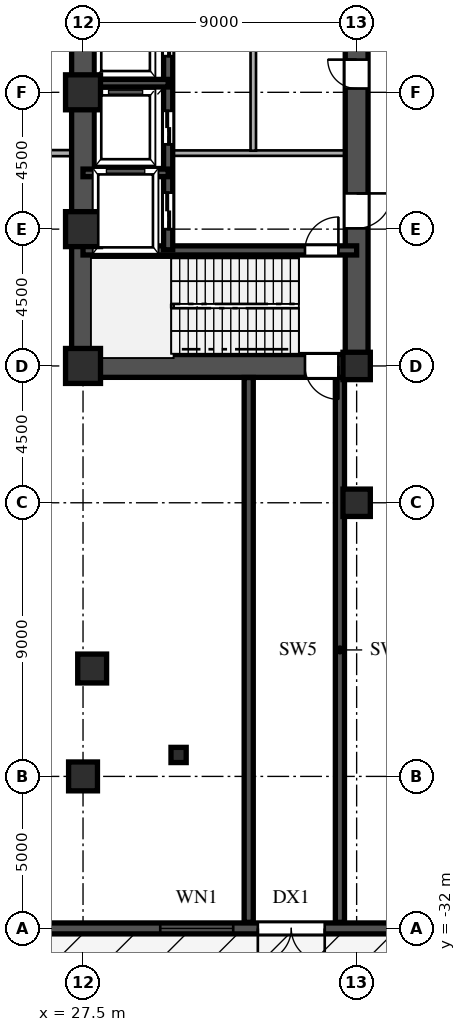
"""IFC4 building model, lengths in metres.
Left out: names, types, materials, properties, quantities, classifications, styles, units other than length and angle.
Written with IfcOpenShell. Run it as: python <this file> out.ifc"""

import sys

from ifc_helpers import new_model, si_unit, direction, frame, frame_2d, origin, origin_2d, place, context, subcontext, project, spatial, rectangle, hollow_rectangle, i_section, extrude, source, transform, mapped, element, fill, save


model = new_model("IFC4")
c1 = context("Model", 3, precision=1e-05, world=origin(), true_north=direction((0.0, 1.0)))
c2 = subcontext(c1, "Body", "Model", "MODEL_VIEW")
j1 = project(units=[si_unit("LENGTHUNIT", "METRE"), si_unit("PLANEANGLEUNIT", "RADIAN")], contexts=[c1])
p1 = place(None, origin())
s1 = spatial("IfcSite", under=j1, at=p1, CompositionType="ELEMENT")
p2 = place(p1, origin())
s2 = spatial("IfcBuilding", under=s1, at=p2, CompositionType="ELEMENT")
p3 = place(p2, origin())
s3 = spatial("IfcBuildingStorey", under=s2, at=p3, CompositionType="ELEMENT", Elevation=0.0)
m1 = source(origin(), c2, "Body", "SweptSolid", [
    extrude(hollow_rectangle(XDim=1.15, YDim=1.15, WallThickness=0.048, at=origin_2d()), origin(), (0.0, 0.0, 1.0), 5.4),
])
for number, where, z_axis, x_axis in (
    (1, (27.5, -13.5, 0.0), (0.0, 0.0, 1.0), (1.0, 0.0, 0.0)),
    (2, (27.5, -9.0, 0.0), (0.0, 0.0, 1.0), (1.0, 0.0, 0.0)),
    (3, (27.5, -4.5, 0.0), (0.0, 0.0, 1.0), (1.0, 0.0, 0.0)),
):
    element("IfcColumn", number, at=place(p3, frame(where, z_axis=z_axis, x_axis=x_axis)), inside=s3, PredefinedType="COLUMN", context=c2, shape_type="MappedRepresentation", body=[
        mapped(m1, transform((0.0, 0.0, 0.0), scale=1.0)),
    ])
m2 = source(origin(), c2, "Body", "SweptSolid", [
    extrude(rectangle(XDim=0.95, YDim=0.95, at=origin_2d()), origin(), (0.0, 0.0, 1.0), 5.4),
])
p4 = place(p3, frame((27.5, -27.0, 0.0), z_axis=(0.0, 0.0, 1.0), x_axis=(1.0, 0.0, 0.0)))
e4 = element("IfcColumn", 4, at=p4, inside=s3, PredefinedType="COLUMN", context=c2, shape_type="MappedRepresentation", body=[
    mapped(m2, transform((0.0, 0.0, 0.0), scale=1.0)),
])
m3 = source(origin(), c2, "Body", "SweptSolid", [
    extrude(i_section(OverallWidth=0.9, OverallDepth=0.9, WebThickness=0.036, FlangeThickness=0.055, at=origin_2d()), origin(), (0.0, 0.0, 1.0), 5.4),
])
for number, where, z_axis, x_axis in (
    (5, (36.5, -18.0, 0.0), (0.0, 0.0, 1.0), (1.0, 0.0, 0.0)),
    (6, (36.5, -13.5, 0.0), (0.0, 0.0, 1.0), (1.0, 0.0, 0.0)),
):
    element("IfcColumn", number, at=place(p3, frame(where, z_axis=z_axis, x_axis=x_axis)), inside=s3, PredefinedType="COLUMN", context=c2, shape_type="MappedRepresentation", body=[
        mapped(m3, transform((0.0, 0.0, 0.0), scale=1.0)),
    ])
m4 = source(origin(), c2, "Body", "SweptSolid", [
    extrude(hollow_rectangle(XDim=0.5, YDim=0.5, WallThickness=0.02, at=origin_2d()), origin(), (0.0, 0.0, 1.0), 5.4),
])
p5 = place(p3, frame((30.643, -26.295, 0.0), z_axis=(0.0, 0.0, 1.0), x_axis=(1.0, 0.0, 0.0)))
e7 = element("IfcColumn", 7, at=p5, inside=s3, PredefinedType="COLUMN", context=c2, shape_type="MappedRepresentation", body=[
    mapped(m4, transform((0.0, 0.0, 0.0), scale=1.0)),
])
p6 = place(p3, frame((27.8, -23.451, 0.0), z_axis=(0.0, 0.0, 1.0), x_axis=(1.0, 0.0, 0.0)))
e8 = element("IfcColumn", 8, at=p6, inside=s3, PredefinedType="COLUMN", context=c2, shape_type="MappedRepresentation", body=[
    mapped(m2, transform((0.0, 0.0, 0.0), scale=1.0)),
])
p7 = place(p3, frame((-71.96, -32.0, 0.0), z_axis=(0.0, 0.0, 1.0), x_axis=(1.0, 0.0, 0.0)))
e9 = element("IfcWall", 9, at=p7, inside=s3, PredefinedType="SOLIDWALL", context=c2, shape_type="SweptSolid", body=[
    extrude(rectangle(XDim=143.92, YDim=0.36, at=frame_2d((71.96, 0.0))), origin(), (0.0, 0.0, 1.0), 5.12),
])
p8 = place(p7, frame((18.0, 0.0, 0.0)))
e10 = element("IfcOpeningElement", 10, at=p8, cuts=e9, PredefinedType="OPENING", context=c2, shape_type="SweptSolid", body=[
    extrude(rectangle(XDim=2.2, YDim=2.4, at=frame_2d((1.1, 1.2))), frame((0.0, 0.19, 0.0), z_axis=(0.0, -1.0, 0.0), x_axis=(1.0, 0.0, 0.0)), (0.0, 0.0, 1.0), 0.38),
])
p9 = place(p7, frame((48.0, 0.0, 0.0)))
e11 = element("IfcOpeningElement", 11, at=p9, cuts=e9, PredefinedType="OPENING", context=c2, shape_type="SweptSolid", body=[
    extrude(rectangle(XDim=1.8, YDim=2.4, at=frame_2d((0.9, 1.2))), frame((0.0, 0.19, 0.0), z_axis=(0.0, -1.0, 0.0), x_axis=(1.0, 0.0, 0.0)), (0.0, 0.0, 1.0), 0.38),
])
p10 = place(p7, frame((57.8, 0.0, 0.0)))
e12 = element("IfcOpeningElement", 12, at=p10, cuts=e9, PredefinedType="OPENING", context=c2, shape_type="SweptSolid", body=[
    extrude(rectangle(XDim=6.2, YDim=3.1, at=frame_2d((3.1, 1.55))), frame((0.0, 0.19, 0.0), z_axis=(0.0, -1.0, 0.0), x_axis=(1.0, 0.0, 0.0)), (0.0, 0.0, 1.0), 0.38),
])
p11 = place(p7, frame((70.7, 0.0, 0.0)))
e13 = element("IfcOpeningElement", 13, at=p11, cuts=e9, PredefinedType="OPENING", context=c2, shape_type="SweptSolid", body=[
    extrude(rectangle(XDim=2.2, YDim=2.4, at=frame_2d((1.1, 1.2))), frame((0.0, 0.19, 0.0), z_axis=(0.0, -1.0, 0.0), x_axis=(1.0, 0.0, 0.0)), (0.0, 0.0, 1.0), 0.38),
])
p12 = place(p7, frame((82.2, 0.0, 0.0)))
e14 = element("IfcOpeningElement", 14, at=p12, cuts=e9, PredefinedType="OPENING", context=c2, shape_type="SweptSolid", body=[
    extrude(rectangle(XDim=1.8, YDim=2.4, at=frame_2d((0.9, 1.2))), frame((0.0, 0.19, 0.0), z_axis=(0.0, -1.0, 0.0), x_axis=(1.0, 0.0, 0.0)), (0.0, 0.0, 1.0), 0.38),
])
p13 = place(p7, frame((120.2, 0.0, 0.0)))
e15 = element("IfcOpeningElement", 15, at=p13, cuts=e9, PredefinedType="OPENING", context=c2, shape_type="SweptSolid", body=[
    extrude(rectangle(XDim=2.2, YDim=2.4, at=frame_2d((1.1, 1.2))), frame((0.0, 0.19, 0.0), z_axis=(0.0, -1.0, 0.0), x_axis=(1.0, 0.0, 0.0)), (0.0, 0.0, 1.0), 0.38),
])
p14 = place(p7, frame((36.51, 0.0, 0.0)))
e16 = element("IfcOpeningElement", 16, at=p14, cuts=e9, PredefinedType="OPENING", context=c2, shape_type="SweptSolid", body=[
    extrude(rectangle(XDim=2.2, YDim=2.4, at=frame_2d((1.1, 1.2))), frame((0.0, 0.19, 0.0), z_axis=(0.0, -1.0, 0.0), x_axis=(1.0, 0.0, 0.0)), (0.0, 0.0, 1.0), 0.38),
])
p15 = place(p7, frame((105.21, 0.0, 0.0)))
e17 = element("IfcOpeningElement", 17, at=p15, cuts=e9, PredefinedType="OPENING", context=c2, shape_type="SweptSolid", body=[
    extrude(rectangle(XDim=2.2, YDim=2.4, at=frame_2d((1.1, 1.2))), frame((0.0, 0.19, 0.0), z_axis=(0.0, -1.0, 0.0), x_axis=(1.0, 0.0, 0.0)), (0.0, 0.0, 1.0), 0.38),
])
p16 = place(p7, frame((6.0, 0.0, 0.9)))
e18 = element("IfcOpeningElement", 18, at=p16, cuts=e9, PredefinedType="OPENING", context=c2, shape_type="SweptSolid", body=[
    extrude(rectangle(XDim=2.4, YDim=2.2, at=frame_2d((1.2, 1.1))), frame((0.0, 0.19, 0.0), z_axis=(0.0, -1.0, 0.0), x_axis=(1.0, 0.0, 0.0)), (0.0, 0.0, 1.0), 0.38),
])
p17 = place(p7, frame((12.0, 0.0, 0.9)))
e19 = element("IfcOpeningElement", 19, at=p17, cuts=e9, PredefinedType="OPENING", context=c2, shape_type="SweptSolid", body=[
    extrude(rectangle(XDim=2.4, YDim=2.2, at=frame_2d((1.2, 1.1))), frame((0.0, 0.19, 0.0), z_axis=(0.0, -1.0, 0.0), x_axis=(1.0, 0.0, 0.0)), (0.0, 0.0, 1.0), 0.38),
])
p18 = place(p7, frame((28.0, 0.0, 0.9)))
e20 = element("IfcOpeningElement", 20, at=p18, cuts=e9, PredefinedType="OPENING", context=c2, shape_type="SweptSolid", body=[
    extrude(rectangle(XDim=2.4, YDim=2.2, at=frame_2d((1.2, 1.1))), frame((0.0, 0.19, 0.0), z_axis=(0.0, -1.0, 0.0), x_axis=(1.0, 0.0, 0.0)), (0.0, 0.0, 1.0), 0.38),
])
p19 = place(p7, frame((91.0, 0.0, 0.9)))
e21 = element("IfcOpeningElement", 21, at=p19, cuts=e9, PredefinedType="OPENING", context=c2, shape_type="SweptSolid", body=[
    extrude(rectangle(XDim=2.4, YDim=2.2, at=frame_2d((1.2, 1.1))), frame((0.0, 0.19, 0.0), z_axis=(0.0, -1.0, 0.0), x_axis=(1.0, 0.0, 0.0)), (0.0, 0.0, 1.0), 0.38),
])
p20 = place(p7, frame((102.0, 0.0, 0.9)))
e22 = element("IfcOpeningElement", 22, at=p20, cuts=e9, PredefinedType="OPENING", context=c2, shape_type="SweptSolid", body=[
    extrude(rectangle(XDim=2.4, YDim=2.2, at=frame_2d((1.2, 1.1))), frame((0.0, 0.19, 0.0), z_axis=(0.0, -1.0, 0.0), x_axis=(1.0, 0.0, 0.0)), (0.0, 0.0, 1.0), 0.38),
])
p21 = place(p7, frame((110.0, 0.0, 0.9)))
e23 = element("IfcOpeningElement", 23, at=p21, cuts=e9, PredefinedType="OPENING", context=c2, shape_type="SweptSolid", body=[
    extrude(rectangle(XDim=2.4, YDim=2.2, at=frame_2d((1.2, 1.1))), frame((0.0, 0.19, 0.0), z_axis=(0.0, -1.0, 0.0), x_axis=(1.0, 0.0, 0.0)), (0.0, 0.0, 1.0), 0.38),
])
p22 = place(p7, frame((130.0, 0.0, 0.9)))
e24 = element("IfcOpeningElement", 24, at=p22, cuts=e9, PredefinedType="OPENING", context=c2, shape_type="SweptSolid", body=[
    extrude(rectangle(XDim=2.4, YDim=2.2, at=frame_2d((1.2, 1.1))), frame((0.0, 0.19, 0.0), z_axis=(0.0, -1.0, 0.0), x_axis=(1.0, 0.0, 0.0)), (0.0, 0.0, 1.0), 0.38),
])
p23 = place(p3, frame((27.5, -13.5, 0.0), z_axis=(0.0, 0.0, 1.0), x_axis=(0.0, 1.0, 0.0)))
e25 = element("IfcWall", 25, at=p23, inside=s3, PredefinedType="SHEAR", context=c2, shape_type="SweptSolid", body=[
    extrude(rectangle(XDim=12.2, YDim=0.75, at=frame_2d((6.1, 0.0))), origin(), (0.0, 0.0, 1.0), 5.12),
])
p24 = place(p3, frame((27.5, -13.5, 0.0), z_axis=(0.0, 0.0, 1.0), x_axis=(1.0, 0.0, 0.0)))
e26 = element("IfcWall", 26, at=p24, inside=s3, PredefinedType="SHEAR", context=c2, shape_type="SweptSolid", body=[
    extrude(rectangle(XDim=9.0, YDim=0.75, at=frame_2d((4.5, 0.0))), origin(), (0.0, 0.0, 1.0), 5.12),
])
p25 = place(p24, frame((7.3, 0.0, 0.0)))
e27 = element("IfcOpeningElement", 27, at=p25, cuts=e26, PredefinedType="OPENING", context=c2, shape_type="SweptSolid", body=[
    extrude(rectangle(XDim=1.1, YDim=2.2, at=frame_2d((0.55, 1.1))), frame((0.0, 0.385, 0.0), z_axis=(0.0, -1.0, 0.0), x_axis=(1.0, 0.0, 0.0)), (0.0, 0.0, 1.0), 0.77),
])
p26 = place(p3, frame((36.5, -13.65, 0.0), z_axis=(0.0, 0.0, 1.0), x_axis=(0.0, 1.0, 0.0)))
e28 = element("IfcWall", 28, at=p26, inside=s3, PredefinedType="SHEAR", context=c2, shape_type="SweptSolid", body=[
    extrude(rectangle(XDim=7.15, YDim=0.75, at=frame_2d((3.575, 0.0))), origin(), (0.0, 0.0, 1.0), 5.12),
])
p27 = place(p26, frame((4.675, 0.0, 0.0)))
e29 = element("IfcOpeningElement", 29, at=p27, cuts=e28, PredefinedType="OPENING", context=c2, shape_type="SweptSolid", body=[
    extrude(rectangle(XDim=1.15, YDim=2.2, at=frame_2d((0.575, 1.1))), frame((0.0, 0.385, 0.0), z_axis=(0.0, -1.0, 0.0), x_axis=(1.0, 0.0, 0.0)), (0.0, 0.0, 1.0), 0.77),
])
p28 = place(p3, frame((36.5, -6.5, 0.0), z_axis=(0.0, 0.0, 1.0), x_axis=(0.0, 1.0, 0.0)))
e30 = element("IfcWall", 30, at=p28, inside=s3, PredefinedType="SHEAR", context=c2, shape_type="SweptSolid", body=[
    extrude(rectangle(XDim=5.2, YDim=0.75, at=frame_2d((2.6, 0.0))), origin(), (0.0, 0.0, 1.0), 5.12),
])
p29 = place(p28, frame((2.125, 0.0, 0.0)))
e31 = element("IfcOpeningElement", 31, at=p29, cuts=e30, PredefinedType="OPENING", context=c2, shape_type="SweptSolid", body=[
    extrude(rectangle(XDim=0.95, YDim=2.15, at=frame_2d((0.475, 1.075))), frame((0.0, 0.385, 0.0), z_axis=(0.0, -1.0, 0.0), x_axis=(1.0, 0.0, 0.0)), (0.0, 0.0, 1.0), 0.77),
])
p30 = place(p3, frame((27.5, -9.7, 0.0), z_axis=(0.0, 0.0, 1.0), x_axis=(1.0, 0.0, 0.0)))
e32 = element("IfcWall", 32, at=p30, inside=s3, PredefinedType="SHEAR", context=c2, shape_type="SweptSolid", body=[
    extrude(rectangle(XDim=9.0, YDim=0.3, at=frame_2d((4.5, 0.0))), origin(), (0.0, 0.0, 1.0), 5.12),
])
p31 = place(p30, frame((7.3, 0.0, 0.0)))
e33 = element("IfcOpeningElement", 33, at=p31, cuts=e32, PredefinedType="OPENING", context=c2, shape_type="SweptSolid", body=[
    extrude(rectangle(XDim=1.1, YDim=2.2, at=frame_2d((0.55, 1.1))), frame((0.0, 0.16, 0.0), z_axis=(0.0, -1.0, 0.0), x_axis=(1.0, 0.0, 0.0)), (0.0, 0.0, 1.0), 0.32),
])
for number, where, z_axis, x_axis in (
    (34, (27.5, -7.15, 0.0), (0.0, 0.0, 1.0), (1.0, 0.0, 0.0)),
    (35, (27.5, -4.2, 0.0), (0.0, 0.0, 1.0), (1.0, 0.0, 0.0)),
):
    element("IfcWall", number, at=place(p3, frame(where, z_axis=z_axis, x_axis=x_axis)), inside=s3, PredefinedType="SHEAR", context=c2, shape_type="SweptSolid", body=[
        extrude(rectangle(XDim=2.8, YDim=0.25, at=frame_2d((1.4, 0.0))), origin(), (0.0, 0.0, 1.0), 5.12),
    ])
p32 = place(p3, frame((30.3, -9.68, 0.0), z_axis=(0.0, 0.0, 1.0), x_axis=(0.0, 1.0, 0.0)))
e36 = element("IfcWall", 36, at=p32, inside=s3, PredefinedType="SHEAR", context=c2, shape_type="SweptSolid", body=[
    extrude(rectangle(XDim=2.56, YDim=0.3, at=frame_2d((1.28, 0.0))), origin(), (0.0, 0.0, 1.0), 5.12),
])
p33 = place(p32, frame((0.68, 0.0, 0.0)))
e37 = element("IfcOpeningElement", 37, at=p33, cuts=e36, PredefinedType="OPENING", context=c2, shape_type="SweptSolid", body=[
    extrude(rectangle(XDim=1.2, YDim=2.25, at=frame_2d((0.6, 1.125))), frame((0.0, 0.16, 0.0), z_axis=(0.0, -1.0, 0.0), x_axis=(1.0, 0.0, 0.0)), (0.0, 0.0, 1.0), 0.32),
])
p34 = place(p3, frame((30.3, -7.12, 0.0), z_axis=(0.0, 0.0, 1.0), x_axis=(0.0, 1.0, 0.0)))
e38 = element("IfcWall", 38, at=p34, inside=s3, PredefinedType="SHEAR", context=c2, shape_type="SweptSolid", body=[
    extrude(rectangle(XDim=2.92, YDim=0.3, at=frame_2d((1.46, 0.0))), origin(), (0.0, 0.0, 1.0), 5.12),
])
p35 = place(p34, frame((0.91, 0.0, 0.0)))
e39 = element("IfcOpeningElement", 39, at=p35, cuts=e38, PredefinedType="OPENING", context=c2, shape_type="SweptSolid", body=[
    extrude(rectangle(XDim=1.1, YDim=2.2, at=frame_2d((0.55, 1.1))), frame((0.0, 0.16, 0.0), z_axis=(0.0, -1.0, 0.0), x_axis=(1.0, 0.0, 0.0)), (0.0, 0.0, 1.0), 0.32),
])
p36 = place(p3, frame((30.3, -4.2, 0.0), z_axis=(0.0, 0.0, 1.0), x_axis=(0.0, 1.0, 0.0)))
e40 = element("IfcWall", 40, at=p36, inside=s3, PredefinedType="SHEAR", context=c2, shape_type="SweptSolid", body=[
    extrude(rectangle(XDim=2.88, YDim=0.3, at=frame_2d((1.44, 0.0))), origin(), (0.0, 0.0, 1.0), 5.12),
])
p37 = place(p36, frame((0.89, 0.0, 0.0)))
e41 = element("IfcOpeningElement", 41, at=p37, cuts=e40, PredefinedType="OPENING", context=c2, shape_type="SweptSolid", body=[
    extrude(rectangle(XDim=1.1, YDim=2.2, at=frame_2d((0.55, 1.1))), frame((0.0, 0.16, 0.0), z_axis=(0.0, -1.0, 0.0), x_axis=(1.0, 0.0, 0.0)), (0.0, 0.0, 1.0), 0.32),
])
p38 = place(p3, frame((30.45, -6.5, 0.0), z_axis=(0.0, 0.0, 1.0), x_axis=(1.0, 0.0, 0.0)))
e42 = element("IfcWall", 42, at=p38, inside=s3, PredefinedType="PARTITIONING", context=c2, shape_type="SweptSolid", body=[
    extrude(rectangle(XDim=5.7, YDim=0.18, at=frame_2d((2.85, 0.0))), origin(), (0.0, 0.0, 1.0), 5.12),
])
p39 = place(p3, frame((33.1, -6.42, 0.0), z_axis=(0.0, 0.0, 1.0), x_axis=(0.0, 1.0, 0.0)))
e43 = element("IfcWall", 43, at=p39, inside=s3, PredefinedType="PARTITIONING", context=c2, shape_type="SweptSolid", body=[
    extrude(rectangle(XDim=5.04, YDim=0.18, at=frame_2d((2.52, 0.0))), origin(), (0.0, 0.0, 1.0), 5.12),
])
p40 = place(p3, frame((-27.12, -6.5, 0.0), z_axis=(0.0, 0.0, 1.0), x_axis=(1.0, 0.0, 0.0)))
e44 = element("IfcWall", 44, at=p40, inside=s3, PredefinedType="PARTITIONING", context=c2, shape_type="SweptSolid", body=[
    extrude(rectangle(XDim=54.24, YDim=0.2, at=frame_2d((27.12, 0.0))), origin(), (0.0, 0.0, 1.0), 5.12),
])
p41 = place(p40, frame((5.145, 0.0, 0.0)))
e45 = element("IfcOpeningElement", 45, at=p41, cuts=e44, PredefinedType="OPENING", context=c2, shape_type="SweptSolid", body=[
    extrude(rectangle(XDim=0.95, YDim=2.15, at=frame_2d((0.475, 1.075))), frame((0.0, 0.11, 0.0), z_axis=(0.0, -1.0, 0.0), x_axis=(1.0, 0.0, 0.0)), (0.0, 0.0, 1.0), 0.22),
])
p42 = place(p40, frame((37.645, 0.0, 0.0)))
e46 = element("IfcOpeningElement", 46, at=p42, cuts=e44, PredefinedType="OPENING", context=c2, shape_type="SweptSolid", body=[
    extrude(rectangle(XDim=0.95, YDim=2.15, at=frame_2d((0.475, 1.075))), frame((0.0, 0.11, 0.0), z_axis=(0.0, -1.0, 0.0), x_axis=(1.0, 0.0, 0.0)), (0.0, 0.0, 1.0), 0.22),
])
for number, where, z_axis, x_axis in (
    (47, (32.95, -31.8, 0.0), (0.0, 0.0, 1.0), (0.0, 1.0, 0.0)),
    (48, (35.95, -31.8, 0.0), (0.0, 0.0, 1.0), (0.0, 1.0, 0.0)),
):
    element("IfcWall", number, at=place(p3, frame(where, z_axis=z_axis, x_axis=x_axis)), inside=s3, PredefinedType="SHEAR", context=c2, shape_type="SweptSolid", body=[
        extrude(rectangle(XDim=17.92, YDim=0.3, at=frame_2d((8.96, 0.0))), origin(), (0.0, 0.0, 1.0), 5.12),
    ])
m5 = source(origin(), c2, "Body", "SweptSolid", [
    extrude(rectangle(XDim=2.2, YDim=2.4, at=frame_2d((1.1, 1.2))), frame((0.0, 0.025, 0.0), z_axis=(0.0, -1.0, 0.0), x_axis=(1.0, 0.0, 0.0)), (0.0, 0.0, 1.0), 0.05),
])
p43 = place(p15, frame((2.2, 0.0, 0.0), z_axis=(0.0, 0.0, 1.0), x_axis=(-1.0, 0.0, 0.0)))
e49 = element("IfcDoor", 49, at=p43, inside=s3, OperationType="DOUBLE_SWING_LEFT", PredefinedType="DOOR", context=c2, shape_type="MappedRepresentation", body=[
    mapped(m5, transform((0.0, 0.0, 0.0), scale=1.0)),
])
fill(e17, e49)
m6 = source(origin(), c2, "Body", "SweptSolid", [
    extrude(rectangle(XDim=2.4, YDim=2.2, at=frame_2d((1.2, 1.1))), frame((0.0, 0.03, 0.0), z_axis=(0.0, -1.0, 0.0), x_axis=(1.0, 0.0, 0.0)), (0.0, 0.0, 1.0), 0.06),
])
p44 = place(p20, origin())
e50 = element("IfcWindow", 50, at=p44, inside=s3, PartitioningType="SINGLE_PANEL", PredefinedType="WINDOW", context=c2, shape_type="MappedRepresentation", body=[
    mapped(m6, transform((0.0, 0.0, 0.0), scale=1.0)),
])
fill(e22, e50)
m7 = source(origin(), c2, "Body", "SweptSolid", [
    extrude(rectangle(XDim=1.1, YDim=2.2, at=frame_2d((0.55, 1.1))), frame((0.0, 0.025, 0.0), z_axis=(0.0, -1.0, 0.0), x_axis=(1.0, 0.0, 0.0)), (0.0, 0.0, 1.0), 0.05),
])
p45 = place(p25, frame((1.1, 0.0, 0.0), z_axis=(0.0, 0.0, 1.0), x_axis=(-1.0, 0.0, 0.0)))
e51 = element("IfcDoor", 51, at=p45, inside=s3, OperationType="SINGLE_SWING_RIGHT", PredefinedType="DOOR", context=c2, shape_type="MappedRepresentation", body=[
    mapped(m7, transform((0.0, 0.0, 0.0), scale=1.0)),
])
fill(e27, e51)
m8 = source(origin(), c2, "Body", "SweptSolid", [
    extrude(rectangle(XDim=1.15, YDim=2.2, at=frame_2d((0.575, 1.1))), frame((0.0, 0.025, 0.0), z_axis=(0.0, -1.0, 0.0), x_axis=(1.0, 0.0, 0.0)), (0.0, 0.0, 1.0), 0.05),
])
p46 = place(p27, frame((1.15, 0.0, 0.0), z_axis=(0.0, 0.0, 1.0), x_axis=(-1.0, 0.0, 0.0)))
e52 = element("IfcDoor", 52, at=p46, inside=s3, OperationType="SINGLE_SWING_RIGHT", PredefinedType="DOOR", context=c2, shape_type="MappedRepresentation", body=[
    mapped(m8, transform((0.0, 0.0, 0.0), scale=1.0)),
])
fill(e29, e52)
m9 = source(origin(), c2, "Body", "SweptSolid", [
    extrude(rectangle(XDim=0.95, YDim=2.15, at=frame_2d((0.475, 1.075))), frame((0.0, 0.025, 0.0), z_axis=(0.0, -1.0, 0.0), x_axis=(1.0, 0.0, 0.0)), (0.0, 0.0, 1.0), 0.05),
])
p47 = place(p29, origin())
e53 = element("IfcDoor", 53, at=p47, inside=s3, OperationType="SINGLE_SWING_RIGHT", PredefinedType="DOOR", context=c2, shape_type="MappedRepresentation", body=[
    mapped(m9, transform((0.0, 0.0, 0.0), scale=1.0)),
])
fill(e31, e53)
p48 = place(p31, origin())
e54 = element("IfcDoor", 54, at=p48, inside=s3, OperationType="SINGLE_SWING_RIGHT", PredefinedType="DOOR", context=c2, shape_type="MappedRepresentation", body=[
    mapped(m7, transform((0.0, 0.0, 0.0), scale=1.0)),
])
fill(e33, e54)
m10 = source(origin(), c2, "Body", "SweptSolid", [
    extrude(rectangle(XDim=1.2, YDim=2.25, at=frame_2d((0.6, 1.125))), frame((0.0, 0.025, 0.0), z_axis=(0.0, -1.0, 0.0), x_axis=(1.0, 0.0, 0.0)), (0.0, 0.0, 1.0), 0.05),
])
p49 = place(p33, origin())
e55 = element("IfcDoor", 55, at=p49, inside=s3, OperationType="DOUBLE_DOOR_SLIDING", PredefinedType="DOOR", context=c2, shape_type="MappedRepresentation", body=[
    mapped(m10, transform((0.0, 0.0, 0.0), scale=1.0)),
])
fill(e37, e55)
m11 = source(origin(), c2, "Body", "SweptSolid", [
    extrude(rectangle(XDim=1.1, YDim=2.2, at=frame_2d((0.55, 1.1))), frame((0.0, 0.025, 0.0), z_axis=(0.0, -1.0, 0.0), x_axis=(1.0, 0.0, 0.0)), (0.0, 0.0, 1.0), 0.05),
])
p50 = place(p35, origin())
e56 = element("IfcDoor", 56, at=p50, inside=s3, OperationType="DOUBLE_DOOR_SLIDING", PredefinedType="DOOR", context=c2, shape_type="MappedRepresentation", body=[
    mapped(m11, transform((0.0, 0.0, 0.0), scale=1.0)),
])
fill(e39, e56)
p51 = place(p37, origin())
e57 = element("IfcDoor", 57, at=p51, inside=s3, OperationType="DOUBLE_DOOR_SLIDING", PredefinedType="DOOR", context=c2, shape_type="MappedRepresentation", body=[
    mapped(m11, transform((0.0, 0.0, 0.0), scale=1.0)),
])
fill(e41, e57)
save(model, sys.argv[1])
